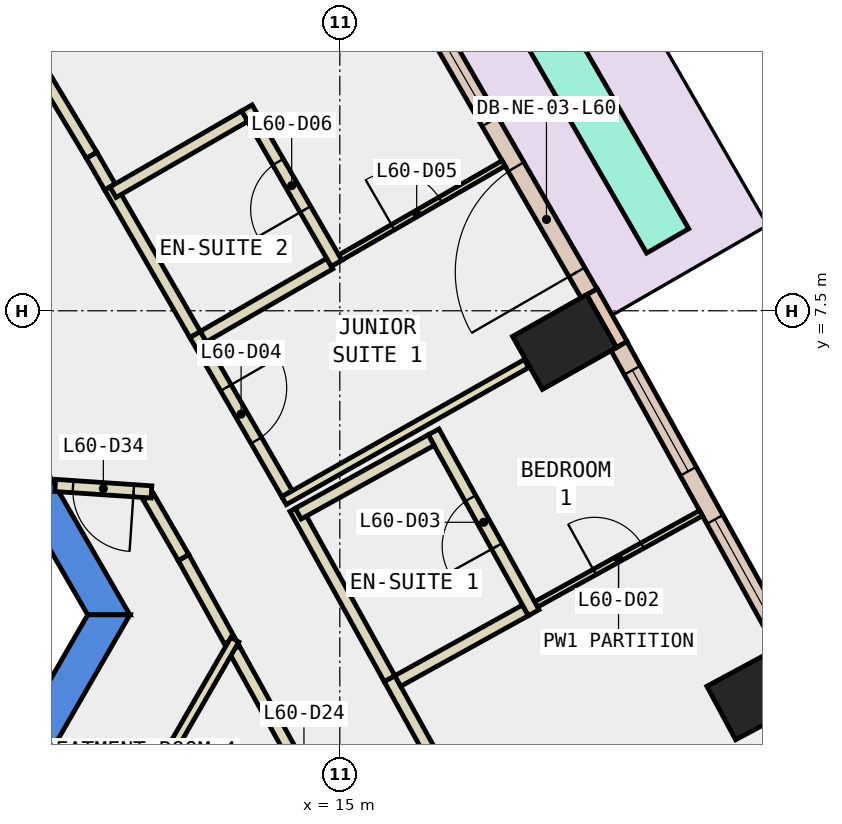
"""IFC4 building model, lengths in metres.
Left out: names, types, materials, properties, quantities, classifications, styles, units other than length and angle.
Written with IfcOpenShell. Run it as: python <this file> out.ifc"""

import sys

from ifc_helpers import new_model, si_unit, direction, frame, frame_2d, origin, origin_2d, place, context, subcontext, project, spatial, polyline, rectangle, outline, extrude, element, fill, save


model = new_model("IFC4")
c1 = context("Model", 3, precision=1e-05, world=origin(), true_north=direction((0.0, 1.0)))
c2 = subcontext(c1, "Body", "Model", "MODEL_VIEW")
j1 = project(units=[si_unit("LENGTHUNIT", "METRE"), si_unit("PLANEANGLEUNIT", "RADIAN")], contexts=[c1])
p1 = place(None, origin())
s1 = spatial("IfcSite", under=j1, at=p1, CompositionType="ELEMENT")
p2 = place(p1, origin())
s2 = spatial("IfcBuilding", under=s1, at=p2, CompositionType="ELEMENT")
p3 = place(p2, frame((0.0, 0.0, 263.0)))
s3 = spatial("IfcBuildingStorey", under=s2, at=p3, CompositionType="ELEMENT", Elevation=263.0)
for number, where, z_axis, x_axis in (
    (1, (21.89, 1.217, -0.34), (0.0, 0.0, 1.0), (-0.474, 0.881, 0.0)),
    (2, (18.696, 6.987, -0.34), (0.0, 0.0, 1.0), (-0.491, 0.871, 0.0)),
):
    element("IfcColumn", number, at=place(p3, frame(where, z_axis=z_axis, x_axis=x_axis)), inside=s3, PredefinedType="COLUMN", context=c2, shape_type="SweptSolid", body=[
        extrude(rectangle(XDim=1.0, YDim=1.4, at=origin_2d()), origin(), (0.0, 0.0, 1.0), 3.6),
    ])
p4 = place(p3, frame((0.0, 0.0, -0.34)))
e3 = element("IfcWall", 3, at=p4, inside=s3, PredefinedType="SHEAR", context=c2, shape_type="SweptSolid", body=[
    extrude(outline(polyline([(6.786, 10.747), (6.266, 10.447), (10.854, 2.5), (11.547, 2.5), (6.786, 10.747)])), origin(), (0.0, 0.0, 1.0), 3.6),
])
p5 = place(p3, frame((0.0, 0.0, -0.34)))
e4 = element("IfcWall", 4, at=p5, inside=s3, PredefinedType="SHEAR", context=c2, shape_type="SweptSolid", body=[
    extrude(outline(polyline([(5.774, -7.5), (11.547, 2.5), (10.854, 2.5), (5.427, -6.9), (5.774, -7.5)])), origin(), (0.0, 0.0, 1.0), 3.6),
])
p6 = place(p3, frame((19.639, 6.944, 0.0), z_axis=(0.0, 0.0, 1.0), x_axis=(-0.491848119507, 0.870681013539, 0.0)))
e5 = element("IfcWall", 5, at=p6, inside=s3, PredefinedType="STANDARD", context=c2, shape_type="SweptSolid", body=[
    extrude(rectangle(XDim=1.0, YDim=0.2, at=frame_2d((0.5, 0.0))), origin(), (0.0, 0.0, 1.0), 3.26),
])
p7 = place(p3, frame((22.308, 2.01, 0.0), z_axis=(0.0, 0.0, 1.0), x_axis=(-0.484260568952, 0.874923826032, 0.0)))
e6 = element("IfcWall", 6, at=p7, inside=s3, PredefinedType="STANDARD", context=c2, shape_type="SweptSolid", body=[
    extrude(rectangle(XDim=5.611, YDim=0.3, at=frame_2d((2.805, 0.0))), origin(), (0.0, 0.0, 1.0), 3.26),
])
p8 = place(p7, frame((0.453, 0.0, 0.9)))
e7 = element("IfcOpeningElement", 7, at=p8, cuts=e6, PredefinedType="OPENING", context=c2, shape_type="SweptSolid", body=[
    extrude(rectangle(XDim=1.9, YDim=2.0, at=frame_2d((0.95, 1.0))), frame((0.0, 0.16, 0.0), z_axis=(0.0, -1.0, 0.0), x_axis=(1.0, 0.0, 0.0)), (0.0, 0.0, 1.0), 0.32),
])
p9 = place(p7, frame((3.258, 0.0, 0.9)))
e8 = element("IfcOpeningElement", 8, at=p9, cuts=e6, PredefinedType="OPENING", context=c2, shape_type="SweptSolid", body=[
    extrude(rectangle(XDim=1.9, YDim=2.0, at=frame_2d((0.95, 1.0))), frame((0.0, 0.16, 0.0), z_axis=(0.0, -1.0, 0.0), x_axis=(1.0, 0.0, 0.0)), (0.0, 0.0, 1.0), 0.32),
])
p10 = place(p3, frame((19.1, 7.787, 0.0), z_axis=(0.0, 0.0, 1.0), x_axis=(-0.500041292042, 0.866001562501, 0.0)))
e9 = element("IfcWall", 9, at=p10, inside=s3, PredefinedType="STANDARD", context=c2, shape_type="SweptSolid", body=[
    extrude(rectangle(XDim=5.612, YDim=0.3, at=frame_2d((2.806, 0.0))), origin(), (0.0, 0.0, 1.0), 3.26),
])
p11 = place(p10, frame((0.403, 0.0, 0.0)))
e10 = element("IfcOpeningElement", 10, at=p11, cuts=e9, PredefinedType="OPENING", context=c2, shape_type="SweptSolid", body=[
    extrude(rectangle(XDim=2.0, YDim=2.4, at=frame_2d((1.0, 1.2))), frame((0.0, 0.16, 0.0), z_axis=(0.0, -1.0, 0.0), x_axis=(1.0, 0.0, 0.0)), (0.0, 0.0, 1.0), 0.32),
])
p12 = place(p10, frame((3.259, 0.0, 0.9)))
e11 = element("IfcOpeningElement", 11, at=p12, cuts=e9, PredefinedType="OPENING", context=c2, shape_type="SweptSolid", body=[
    extrude(rectangle(XDim=1.9, YDim=2.0, at=frame_2d((0.95, 1.0))), frame((0.0, 0.16, 0.0), z_axis=(0.0, -1.0, 0.0), x_axis=(1.0, 0.0, 0.0)), (0.0, 0.0, 1.0), 0.32),
])
p13 = place(p3, frame((20.392, 8.649, 0.0), z_axis=(0.0, 0.0, 1.0), x_axis=(-0.500079142514, 0.865979706011, 0.0)))
e12 = element("IfcWall", 12, at=p13, inside=s3, PredefinedType="STANDARD", context=c2, shape_type="SweptSolid", body=[
    extrude(rectangle(XDim=5.411, YDim=0.8, at=frame_2d((2.706, 0.0))), origin(), (0.0, 0.0, 1.0), 0.8),
])
p14 = place(p3, frame((13.188, 2.071, 0.0), z_axis=(0.0, 0.0, 1.0), x_axis=(-0.484398936474, 0.874847226859, 0.0)))
e13 = element("IfcWall", 13, at=p14, inside=s3, PredefinedType="PARTITIONING", context=c2, shape_type="SweptSolid", body=[
    extrude(rectangle(XDim=1.567, YDim=0.2, at=frame_2d((0.783, 0.0))), origin(), (0.0, 0.0, 1.0), 3.26),
])
p15 = place(p3, frame((12.429, 3.442, 0.0), z_axis=(0.0, 0.0, 1.0), x_axis=(-0.500076612374, 0.865981167091, 0.0)))
e14 = element("IfcWall", 14, at=p15, inside=s3, PredefinedType="PARTITIONING", context=c2, shape_type="SweptSolid", body=[
    extrude(rectangle(XDim=1.154, YDim=0.2, at=frame_2d((0.577, 0.0))), origin(), (0.0, 0.0, 1.0), 3.26),
])
p16 = place(p3, frame((11.902, 4.521, 0.0), z_axis=(0.0, 0.0, 1.0), x_axis=(-0.997726217037, 0.067397298437, 0.0)))
e15 = element("IfcWall", 15, at=p16, inside=s3, PredefinedType="PARTITIONING", context=c2, shape_type="SweptSolid", body=[
    extrude(rectangle(XDim=1.587, YDim=0.2, at=frame_2d((0.793, 0.0))), origin(), (0.0, 0.0, 1.0), 3.26),
])
p17 = place(p16, frame((0.293, 0.0, 0.0)))
e16 = element("IfcOpeningElement", 16, at=p17, cuts=e15, PredefinedType="OPENING", context=c2, shape_type="SweptSolid", body=[
    extrude(rectangle(XDim=1.0, YDim=2.1, at=frame_2d((0.5, 1.05))), frame((0.0, 0.11, 0.0), z_axis=(0.0, -1.0, 0.0), x_axis=(1.0, 0.0, 0.0)), (0.0, 0.0, 1.0), 0.22),
])
p18 = place(p3, frame((15.56, -2.214, 0.0), z_axis=(0.0, 0.0, 1.0), x_axis=(-0.484323615817, 0.874888927329, 0.0)))
e17 = element("IfcWall", 17, at=p18, inside=s3, PredefinedType="PARTITIONING", context=c2, shape_type="SweptSolid", body=[
    extrude(rectangle(XDim=4.747, YDim=0.2, at=frame_2d((2.374, 0.0))), origin(), (0.0, 0.0, 1.0), 3.26),
])
p19 = place(p18, frame((1.874, 0.0, 0.0)))
e18 = element("IfcOpeningElement", 18, at=p19, cuts=e17, PredefinedType="OPENING", context=c2, shape_type="SweptSolid", body=[
    extrude(rectangle(XDim=1.0, YDim=2.1, at=frame_2d((0.5, 1.05))), frame((0.0, 0.11, 0.0), z_axis=(0.0, -1.0, 0.0), x_axis=(1.0, 0.0, 0.0)), (0.0, 0.0, 1.0), 0.22),
])
p20 = place(p3, frame((15.817, 1.451, 0.0), z_axis=(0.0, 0.0, 1.0), x_axis=(0.48417811398, -0.874969458863, 0.0)))
e19 = element("IfcWall", 19, at=p20, inside=s3, PredefinedType="PARTITIONING", context=c2, shape_type="SweptSolid", body=[
    extrude(rectangle(XDim=3.101, YDim=0.2, at=frame_2d((1.55, 0.0))), origin(), (0.0, 0.0, 1.0), 3.26),
])
p21 = place(p3, frame((14.267, 4.25, 0.0), z_axis=(0.0, 0.0, 1.0), x_axis=(0.4843920198, -0.874851056554, 0.0)))
e20 = element("IfcWall", 20, at=p21, inside=s3, PredefinedType="PARTITIONING", context=c2, shape_type="SweptSolid", body=[
    extrude(rectangle(XDim=3.199, YDim=0.2, at=frame_2d((1.6, 0.0))), origin(), (0.0, 0.0, 1.0), 3.26),
])
p22 = place(p3, frame((12.62, 7.111, 0.0), z_axis=(0.0, 0.0, 1.0), x_axis=(0.499950733426, -0.866053845986, 0.0)))
e21 = element("IfcWall", 21, at=p22, inside=s3, PredefinedType="PARTITIONING", context=c2, shape_type="SweptSolid", body=[
    extrude(rectangle(XDim=3.024, YDim=0.2, at=frame_2d((1.512, 0.0))), origin(), (0.0, 0.0, 1.0), 3.26),
])
p23 = place(p22, frame((1.013, 0.0, 0.0)))
e22 = element("IfcOpeningElement", 22, at=p23, cuts=e21, PredefinedType="OPENING", context=c2, shape_type="SweptSolid", body=[
    extrude(rectangle(XDim=1.0, YDim=2.1, at=frame_2d((0.5, 1.05))), frame((0.0, 0.11, 0.0), z_axis=(0.0, -1.0, 0.0), x_axis=(1.0, 0.0, 0.0)), (0.0, 0.0, 1.0), 0.22),
])
p24 = place(p3, frame((9.281, 12.779, 0.0), z_axis=(0.0, 0.0, 1.0), x_axis=(0.515568955032, -0.856848091908, 0.0)))
e23 = element("IfcWall", 23, at=p24, inside=s3, PredefinedType="PARTITIONING", context=c2, shape_type="SweptSolid", body=[
    extrude(rectangle(XDim=3.177, YDim=0.2, at=frame_2d((1.588, 0.0))), origin(), (0.0, 0.0, 1.0), 3.26),
])
p25 = place(p3, frame((10.919, 10.057, 0.0), z_axis=(0.0, 0.0, 1.0), x_axis=(0.500284357783, -0.865861167485, 0.0)))
e24 = element("IfcWall", 24, at=p25, inside=s3, PredefinedType="PARTITIONING", context=c2, shape_type="SweptSolid", body=[
    extrude(rectangle(XDim=0.602, YDim=0.2, at=frame_2d((0.301, 0.0))), origin(), (0.0, 0.0, 1.0), 3.26),
])
p26 = place(p3, frame((11.22, 9.536, 0.0), z_axis=(0.0, 0.0, 1.0), x_axis=(0.500049511043, -0.865996816683, 0.0)))
e25 = element("IfcWall", 25, at=p26, inside=s3, PredefinedType="PARTITIONING", context=c2, shape_type="SweptSolid", body=[
    extrude(rectangle(XDim=2.8, YDim=0.2, at=frame_2d((1.4, 0.0))), origin(), (0.0, 0.0, 1.0), 3.26),
])
p27 = place(p3, frame((18.228, 2.671, 0.0), z_axis=(0.0, 0.0, 1.0), x_axis=(0.874895591854, 0.484311576729, 0.0)))
e26 = element("IfcWall", 26, at=p27, inside=s3, PredefinedType="PARTITIONING", context=c2, shape_type="SweptSolid", body=[
    extrude(rectangle(XDim=3.1, YDim=0.1, at=frame_2d((1.55, 0.0))), origin(), (0.0, 0.0, 1.0), 3.26),
])
p28 = place(p27, frame((1.1, 0.0, 0.0)))
e27 = element("IfcOpeningElement", 27, at=p28, cuts=e26, PredefinedType="OPENING", context=c2, shape_type="SweptSolid", body=[
    extrude(rectangle(XDim=0.9, YDim=2.1, at=frame_2d((0.45, 1.05))), frame((0.0, 0.06, 0.0), z_axis=(0.0, -1.0, 0.0), x_axis=(1.0, 0.0, 0.0)), (0.0, 0.0, 1.0), 0.12),
])
p29 = place(p3, frame((15.953, 1.412, 0.0), z_axis=(0.0, 0.0, 1.0), x_axis=(0.875014790305, 0.484096185429, 0.0)))
e28 = element("IfcWall", 28, at=p29, inside=s3, PredefinedType="PARTITIONING", context=c2, shape_type="SweptSolid", body=[
    extrude(rectangle(XDim=2.4, YDim=0.2, at=frame_2d((1.2, 0.0))), origin(), (0.0, 0.0, 1.0), 3.26),
])
p30 = place(p3, frame((18.189, 2.535, 0.0), z_axis=(0.0, 0.0, 1.0), x_axis=(-0.484447408253, 0.874820386501, 0.0)))
e29 = element("IfcWall", 29, at=p30, inside=s3, PredefinedType="PARTITIONING", context=c2, shape_type="SweptSolid", body=[
    extrude(rectangle(XDim=3.4, YDim=0.2, at=frame_2d((1.7, 0.0))), origin(), (0.0, 0.0, 1.0), 3.26),
])
p31 = place(p30, frame((1.25, 0.0, 0.0)))
e30 = element("IfcOpeningElement", 30, at=p31, cuts=e29, PredefinedType="OPENING", context=c2, shape_type="SweptSolid", body=[
    extrude(rectangle(XDim=0.9, YDim=2.1, at=frame_2d((0.45, 1.05))), frame((0.0, 0.11, 0.0), z_axis=(0.0, -1.0, 0.0), x_axis=(1.0, 0.0, 0.0)), (0.0, 0.0, 1.0), 0.22),
])
p32 = place(p3, frame((16.503, 5.374, 0.0), z_axis=(0.0, 0.0, 1.0), x_axis=(-0.874847389013, -0.484398643615, 0.0)))
e31 = element("IfcWall", 31, at=p32, inside=s3, PredefinedType="PARTITIONING", context=c2, shape_type="SweptSolid", body=[
    extrude(rectangle(XDim=2.5, YDim=0.2, at=frame_2d((1.25, 0.0))), origin(), (0.0, 0.0, 1.0), 3.26),
])
p33 = place(p3, frame((14.083, 4.377, 0.0), z_axis=(0.0, 0.0, 1.0), x_axis=(0.870415885751, 0.492317159799, 0.0)))
e32 = element("IfcWall", 32, at=p33, inside=s3, PredefinedType="PARTITIONING", context=c2, shape_type="SweptSolid", body=[
    extrude(rectangle(XDim=4.581, YDim=0.15, at=frame_2d((2.29, 0.0))), origin(), (0.0, 0.0, 1.0), 3.26),
])
p34 = place(p3, frame((14.835, 8.275, 0.0), z_axis=(0.0, 0.0, 1.0), x_axis=(0.8660266723, 0.49999780286, 0.0)))
e33 = element("IfcWall", 33, at=p34, inside=s3, PredefinedType="PARTITIONING", context=c2, shape_type="SweptSolid", body=[
    extrude(rectangle(XDim=3.3, YDim=0.1, at=frame_2d((1.65, 0.0))), origin(), (0.0, 0.0, 1.0), 3.26),
])
p35 = place(p34, frame((1.2, 0.0, 0.0)))
e34 = element("IfcOpeningElement", 34, at=p35, cuts=e33, PredefinedType="OPENING", context=c2, shape_type="SweptSolid", body=[
    extrude(rectangle(XDim=0.9, YDim=2.1, at=frame_2d((0.45, 1.05))), frame((0.0, 0.06, 0.0), z_axis=(0.0, -1.0, 0.0), x_axis=(1.0, 0.0, 0.0)), (0.0, 0.0, 1.0), 0.12),
])
p36 = place(p3, frame((12.756, 7.075, 0.0), z_axis=(0.0, 0.0, 1.0), x_axis=(0.866075499611, 0.499913221443, 0.0)))
e35 = element("IfcWall", 35, at=p36, inside=s3, PredefinedType="PARTITIONING", context=c2, shape_type="SweptSolid", body=[
    extrude(rectangle(XDim=2.4, YDim=0.2, at=frame_2d((1.2, 0.0))), origin(), (0.0, 0.0, 1.0), 3.26),
])
p37 = place(p3, frame((14.946, 8.281, 0.0), z_axis=(0.0, 0.0, 1.0), x_axis=(-0.500001826776, 0.866024349092, 0.0)))
e36 = element("IfcWall", 36, at=p37, inside=s3, PredefinedType="PARTITIONING", context=c2, shape_type="SweptSolid", body=[
    extrude(rectangle(XDim=2.95, YDim=0.2, at=frame_2d((1.475, 0.0))), origin(), (0.0, 0.0, 1.0), 3.26),
])
p38 = place(p37, frame((1.025, 0.0, 0.0)))
e37 = element("IfcOpeningElement", 37, at=p38, cuts=e36, PredefinedType="OPENING", context=c2, shape_type="SweptSolid", body=[
    extrude(rectangle(XDim=0.9, YDim=2.1, at=frame_2d((0.45, 1.05))), frame((0.0, 0.11, 0.0), z_axis=(0.0, -1.0, 0.0), x_axis=(1.0, 0.0, 0.0)), (0.0, 0.0, 1.0), 0.22),
])
p39 = place(p3, frame((13.435, 10.7, 0.0), z_axis=(0.0, 0.0, 1.0), x_axis=(-0.866022959057, -0.500004234368, 0.0)))
e38 = element("IfcWall", 38, at=p39, inside=s3, PredefinedType="PARTITIONING", context=c2, shape_type="SweptSolid", body=[
    extrude(rectangle(XDim=2.5, YDim=0.2, at=frame_2d((1.25, 0.0))), origin(), (0.0, 0.0, 1.0), 3.26),
])
p40 = place(p3, frame((9.25, -4.878, 0.0), z_axis=(0.0, 0.0, 1.0), x_axis=(0.499982416899, 0.866035555154, 0.0)))
e39 = element("IfcWall", 39, at=p40, inside=s3, PredefinedType="PARTITIONING", context=c2, shape_type="SweptSolid", body=[
    extrude(rectangle(XDim=8.048, YDim=0.15, at=frame_2d((4.024, 0.0))), origin(), (0.0, 0.0, 1.0), 3.26),
])
p41 = place(p8, origin())
e40 = element("IfcWindow", 40, at=p41, inside=s3, PartitioningType="SINGLE_PANEL", PredefinedType="WINDOW", context=c2, shape_type="SweptSolid", body=[
    extrude(rectangle(XDim=1.9, YDim=2.0, at=frame_2d((0.95, 1.0))), frame((0.0, 0.03, 0.0), z_axis=(0.0, -1.0, 0.0), x_axis=(1.0, 0.0, 0.0)), (0.0, 0.0, 1.0), 0.06),
])
fill(e7, e40)
p42 = place(p9, origin())
e41 = element("IfcWindow", 41, at=p42, inside=s3, PartitioningType="SINGLE_PANEL", PredefinedType="WINDOW", context=c2, shape_type="SweptSolid", body=[
    extrude(rectangle(XDim=1.9, YDim=2.0, at=frame_2d((0.95, 1.0))), frame((0.0, 0.03, 0.0), z_axis=(0.0, -1.0, 0.0), x_axis=(1.0, 0.0, 0.0)), (0.0, 0.0, 1.0), 0.06),
])
fill(e8, e41)
p43 = place(p11, origin())
e42 = element("IfcDoor", 42, at=p43, inside=s3, OperationType="SLIDING_TO_LEFT", PredefinedType="DOOR", context=c2, shape_type="SweptSolid", body=[
    extrude(rectangle(XDim=2.0, YDim=2.4, at=frame_2d((1.0, 1.2))), frame((0.0, 0.025, 0.0), z_axis=(0.0, -1.0, 0.0), x_axis=(1.0, 0.0, 0.0)), (0.0, 0.0, 1.0), 0.05),
])
fill(e10, e42)
p44 = place(p12, origin())
e43 = element("IfcWindow", 43, at=p44, inside=s3, PartitioningType="SINGLE_PANEL", PredefinedType="WINDOW", context=c2, shape_type="SweptSolid", body=[
    extrude(rectangle(XDim=1.9, YDim=2.0, at=frame_2d((0.95, 1.0))), frame((0.0, 0.03, 0.0), z_axis=(0.0, -1.0, 0.0), x_axis=(1.0, 0.0, 0.0)), (0.0, 0.0, 1.0), 0.06),
])
fill(e11, e43)
p45 = place(p28, origin())
e44 = element("IfcDoor", 44, at=p45, inside=s3, OperationType="SINGLE_SWING_RIGHT", PredefinedType="DOOR", context=c2, shape_type="SweptSolid", body=[
    extrude(rectangle(XDim=0.9, YDim=2.1, at=frame_2d((0.45, 1.05))), frame((0.0, 0.025, 0.0), z_axis=(0.0, -1.0, 0.0), x_axis=(1.0, 0.0, 0.0)), (0.0, 0.0, 1.0), 0.05),
])
fill(e27, e44)
p46 = place(p31, origin())
e45 = element("IfcDoor", 45, at=p46, inside=s3, OperationType="SINGLE_SWING_LEFT", PredefinedType="DOOR", context=c2, shape_type="SweptSolid", body=[
    extrude(rectangle(XDim=0.9, YDim=2.1, at=frame_2d((0.45, 1.05))), frame((0.0, 0.025, 0.0), z_axis=(0.0, -1.0, 0.0), x_axis=(1.0, 0.0, 0.0)), (0.0, 0.0, 1.0), 0.05),
])
fill(e30, e45)
p47 = place(p23, origin())
e46 = element("IfcDoor", 46, at=p47, inside=s3, OperationType="SINGLE_SWING_LEFT", PredefinedType="DOOR", context=c2, shape_type="SweptSolid", body=[
    extrude(rectangle(XDim=1.0, YDim=2.1, at=frame_2d((0.5, 1.05))), frame((0.0, 0.025, 0.0), z_axis=(0.0, -1.0, 0.0), x_axis=(1.0, 0.0, 0.0)), (0.0, 0.0, 1.0), 0.05),
])
fill(e22, e46)
p48 = place(p35, origin())
e47 = element("IfcDoor", 47, at=p48, inside=s3, OperationType="SINGLE_SWING_RIGHT", PredefinedType="DOOR", context=c2, shape_type="SweptSolid", body=[
    extrude(rectangle(XDim=0.9, YDim=2.1, at=frame_2d((0.45, 1.05))), frame((0.0, 0.025, 0.0), z_axis=(0.0, -1.0, 0.0), x_axis=(1.0, 0.0, 0.0)), (0.0, 0.0, 1.0), 0.05),
])
fill(e34, e47)
p49 = place(p38, origin())
e48 = element("IfcDoor", 48, at=p49, inside=s3, OperationType="SINGLE_SWING_LEFT", PredefinedType="DOOR", context=c2, shape_type="SweptSolid", body=[
    extrude(rectangle(XDim=0.9, YDim=2.1, at=frame_2d((0.45, 1.05))), frame((0.0, 0.025, 0.0), z_axis=(0.0, -1.0, 0.0), x_axis=(1.0, 0.0, 0.0)), (0.0, 0.0, 1.0), 0.05),
])
fill(e37, e48)
p50 = place(p17, origin())
e49 = element("IfcDoor", 49, at=p50, inside=s3, OperationType="SINGLE_SWING_LEFT", PredefinedType="DOOR", context=c2, shape_type="SweptSolid", body=[
    extrude(rectangle(XDim=1.0, YDim=2.1, at=frame_2d((0.5, 1.05))), frame((0.0, 0.025, 0.0), z_axis=(0.0, -1.0, 0.0), x_axis=(1.0, 0.0, 0.0)), (0.0, 0.0, 1.0), 0.05),
])
fill(e16, e49)
save(model, sys.argv[1])
